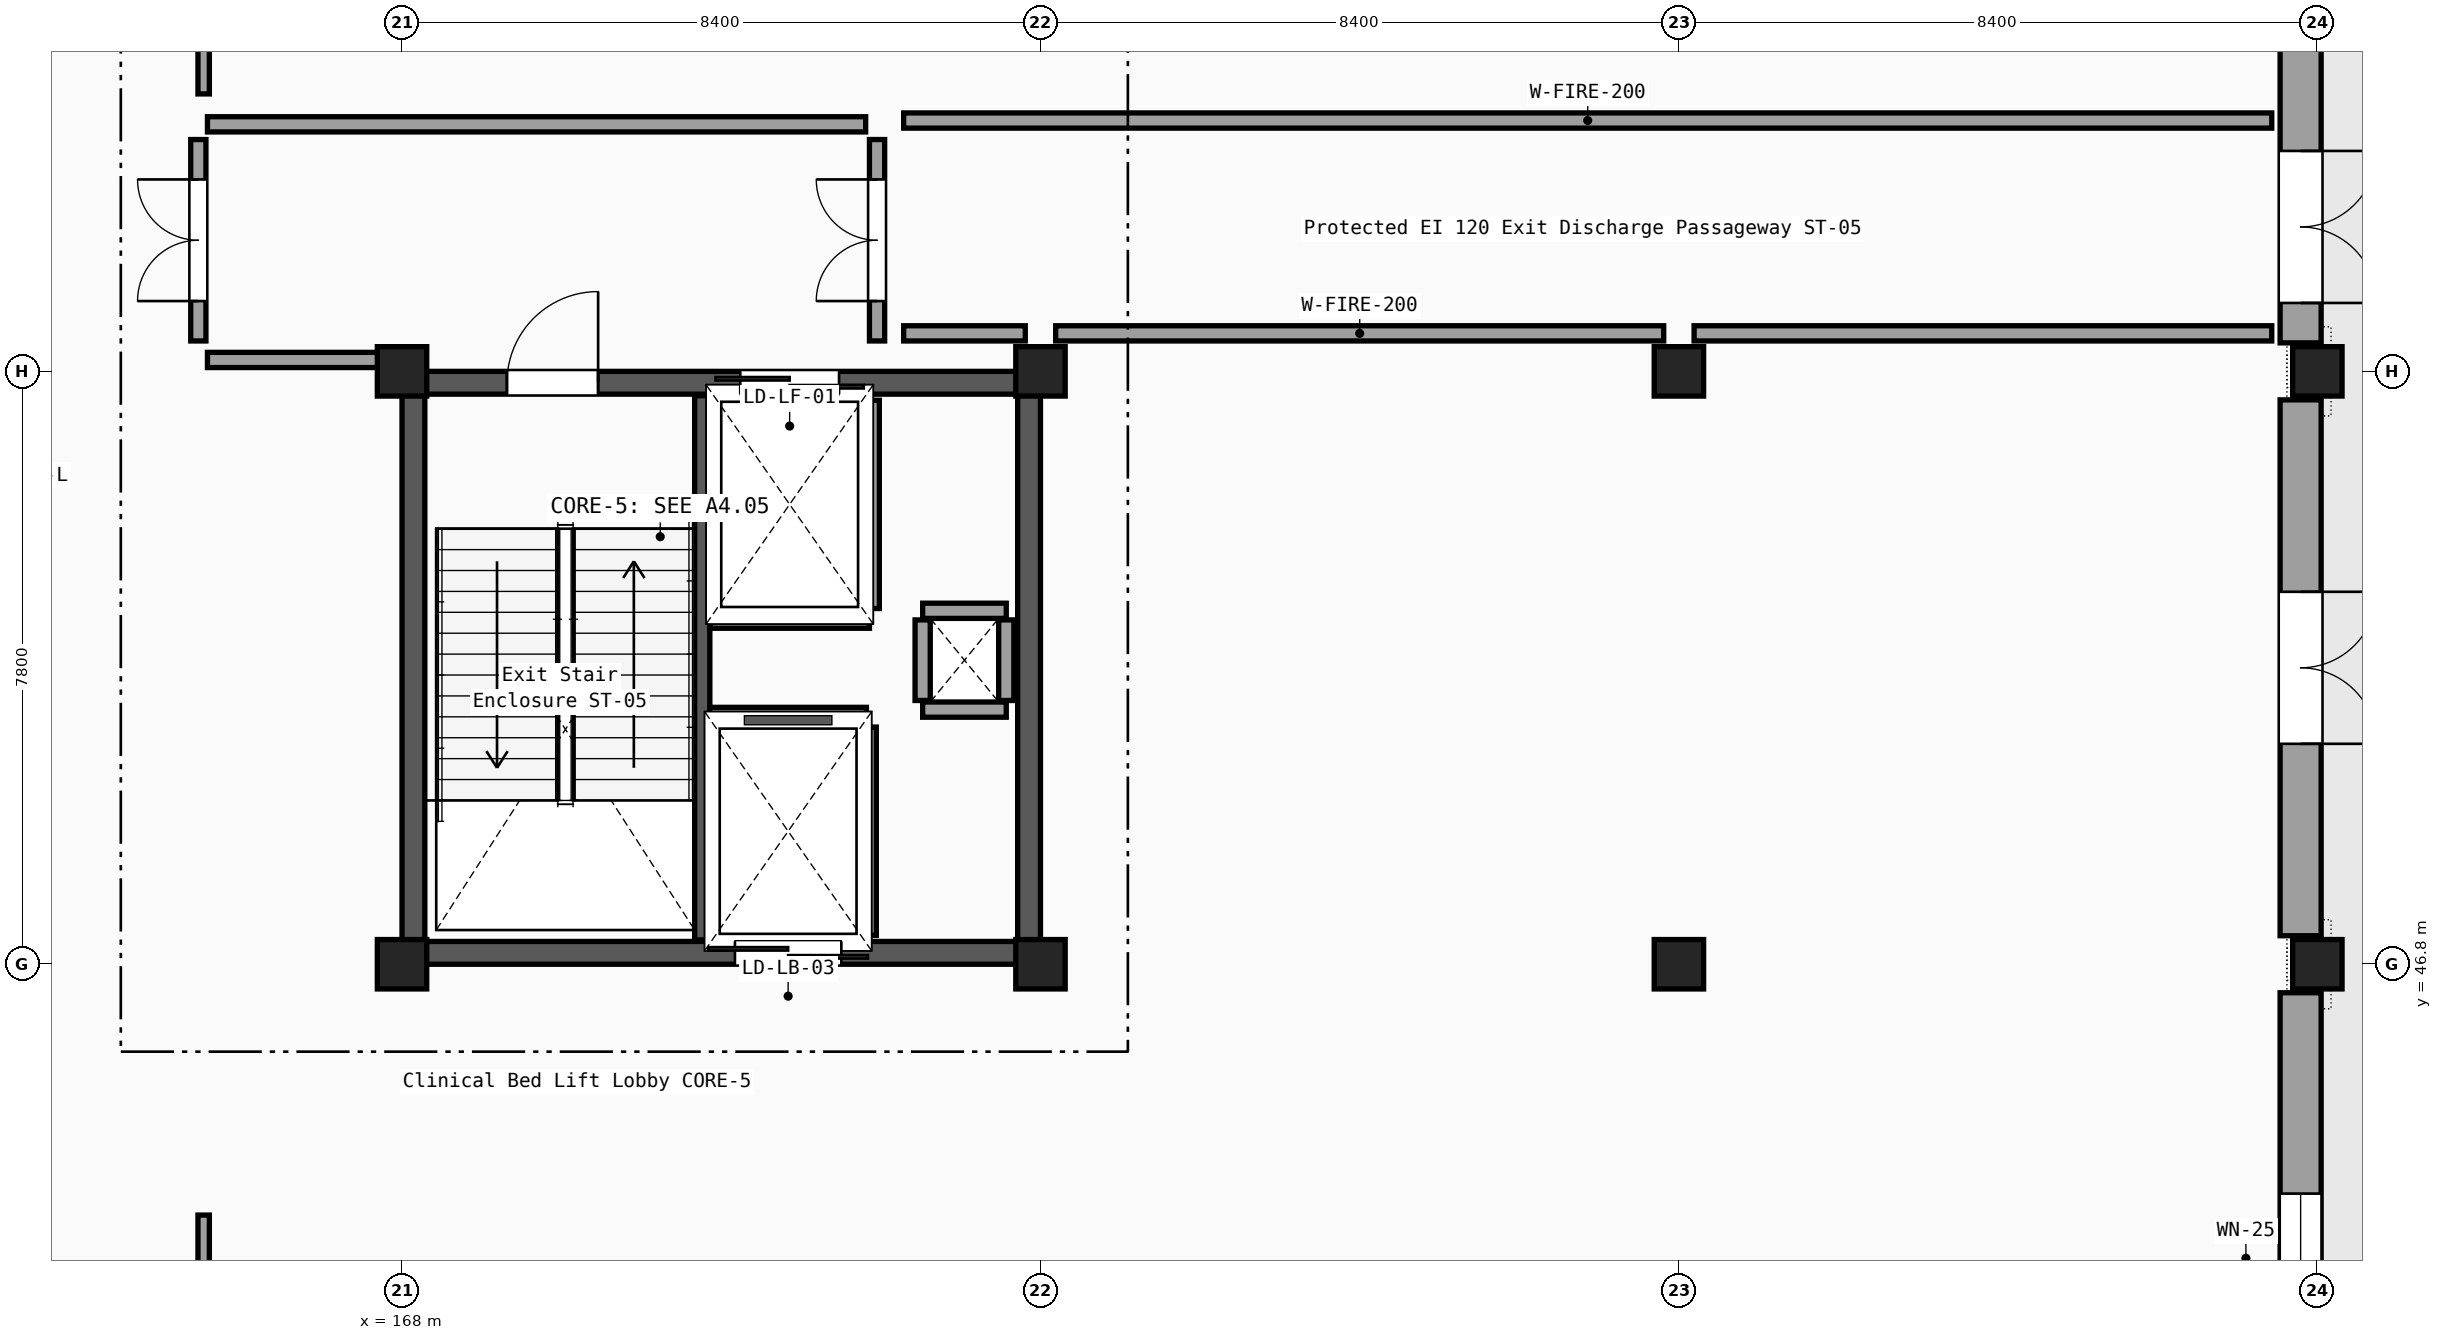
"""IFC4 building model, lengths in metres.
Left out: names, types, materials, properties, quantities, classifications, styles, units other than length and angle.
Written with IfcOpenShell. Run it as: python <this file> out.ifc"""

import sys

from ifc_helpers import new_model, si_unit, direction, frame, frame_2d, origin, origin_2d, place, context, subcontext, project, spatial, rectangle, i_section, extrude, element, fill, save


model = new_model("IFC4")
c1 = context("Model", 3, precision=1e-05, world=origin(), true_north=direction((0.0, 1.0)))
c2 = subcontext(c1, "Body", "Model", "MODEL_VIEW")
j1 = project(units=[si_unit("LENGTHUNIT", "METRE"), si_unit("PLANEANGLEUNIT", "RADIAN")], contexts=[c1])
p1 = place(None, origin())
s1 = spatial("IfcSite", under=j1, at=p1, CompositionType="ELEMENT")
p2 = place(p1, origin())
s2 = spatial("IfcBuilding", under=s1, at=p2, CompositionType="ELEMENT")
p3 = place(p2, origin())
s3 = spatial("IfcBuildingStorey", under=s2, at=p3, CompositionType="ELEMENT", Elevation=0.0)
for number, where, z_axis, x_axis in (
    (1, (168.0, 46.8, 0.0), (0.0, 0.0, 1.0), (1.0, 0.0, 0.0)),
    (2, (168.0, 54.6, 0.0), (0.0, 0.0, 1.0), (1.0, 0.0, 0.0)),
    (3, (176.4, 46.8, 0.0), (0.0, 0.0, 1.0), (1.0, 0.0, 0.0)),
    (4, (176.4, 54.6, 0.0), (0.0, 0.0, 1.0), (1.0, 0.0, 0.0)),
    (5, (184.8, 46.8, 0.0), (0.0, 0.0, 1.0), (1.0, 0.0, 0.0)),
    (6, (184.8, 54.6, 0.0), (0.0, 0.0, 1.0), (1.0, 0.0, 0.0)),
    (7, (193.2, 46.8, 0.0), (0.0, 0.0, 1.0), (1.0, 0.0, 0.0)),
    (8, (193.2, 54.6, 0.0), (0.0, 0.0, 1.0), (1.0, 0.0, 0.0)),
):
    element("IfcColumn", number, at=place(p3, frame(where, z_axis=z_axis, x_axis=x_axis)), inside=s3, PredefinedType="COLUMN", context=c2, shape_type="SweptSolid", body=[
        extrude(i_section(OverallWidth=0.3, OverallDepth=0.65, WebThickness=0.016, FlangeThickness=0.031, FilletRadius=0.027, at=origin_2d()), origin(), (0.0, 0.0, 1.0), 5.1),
    ])
p4 = place(p3, frame((192.98, 39.44, 0.0), z_axis=(0.0, 0.0, 1.0), x_axis=(0.0, 1.0, 0.0)))
e9 = element("IfcWall", 9, at=p4, inside=s3, PredefinedType="SOLIDWALL", context=c2, shape_type="SweptSolid", body=[
    extrude(rectangle(XDim=6.985, YDim=0.54, at=frame_2d((3.493, 0.0))), origin(), (0.0, 0.0, 1.0), 4.33),
])
p5 = place(p4, frame((2.643, 0.0, 0.95)))
e10 = element("IfcOpeningElement", 10, at=p5, cuts=e9, PredefinedType="OPENING", context=c2, shape_type="SweptSolid", body=[
    extrude(rectangle(XDim=1.7, YDim=1.55, at=frame_2d((0.85, 0.775))), frame((0.0, 0.28, 0.0), z_axis=(0.0, -1.0, 0.0), x_axis=(1.0, 0.0, 0.0)), (0.0, 0.0, 1.0), 0.56),
])
p6 = place(p3, frame((192.98, 47.175, 0.0), z_axis=(0.0, 0.0, 1.0), x_axis=(0.0, 1.0, 0.0)))
e11 = element("IfcWall", 11, at=p6, inside=s3, PredefinedType="SOLIDWALL", context=c2, shape_type="SweptSolid", body=[
    extrude(rectangle(XDim=7.05, YDim=0.54, at=frame_2d((3.525, 0.0))), origin(), (0.0, 0.0, 1.0), 4.33),
])
p7 = place(p6, frame((2.525, 0.0, 0.0)))
e12 = element("IfcOpeningElement", 12, at=p7, cuts=e11, PredefinedType="OPENING", context=c2, shape_type="SweptSolid", body=[
    extrude(rectangle(XDim=2.0, YDim=2.25, at=frame_2d((1.0, 1.125))), frame((0.0, 0.28, 0.0), z_axis=(0.0, -1.0, 0.0), x_axis=(1.0, 0.0, 0.0)), (0.0, 0.0, 1.0), 0.56),
])
p8 = place(p3, frame((192.98, 54.975, 0.0), z_axis=(0.0, 0.0, 1.0), x_axis=(0.0, 1.0, 0.0)))
e13 = element("IfcWall", 13, at=p8, inside=s3, PredefinedType="SOLIDWALL", context=c2, shape_type="SweptSolid", body=[
    extrude(rectangle(XDim=7.05, YDim=0.54, at=frame_2d((3.525, 0.0))), origin(), (0.0, 0.0, 1.0), 4.33),
])
p9 = place(p8, frame((0.525, 0.0, 0.0)))
e14 = element("IfcOpeningElement", 14, at=p9, cuts=e13, PredefinedType="OPENING", context=c2, shape_type="SweptSolid", body=[
    extrude(rectangle(XDim=2.0, YDim=2.25, at=frame_2d((1.0, 1.125))), frame((0.0, 0.28, 0.0), z_axis=(0.0, -1.0, 0.0), x_axis=(1.0, 0.0, 0.0)), (0.0, 0.0, 1.0), 0.56),
])
p10 = place(p3, frame((168.0, 46.95, 0.0), z_axis=(0.0, 0.0, 1.0), x_axis=(1.0, 0.0, 0.0)))
e15 = element("IfcWall", 15, at=p10, inside=s3, PredefinedType="SHEAR", context=c2, shape_type="SweptSolid", body=[
    extrude(rectangle(XDim=8.4, YDim=0.3, at=frame_2d((4.2, 0.0))), origin(), (0.0, 0.0, 1.0), 4.85),
])
p11 = place(p10, frame((4.38, 0.0, 0.0)))
e16 = element("IfcOpeningElement", 16, at=p11, cuts=e15, PredefinedType="OPENING", context=c2, shape_type="SweptSolid", body=[
    extrude(rectangle(XDim=1.4, YDim=2.2, at=frame_2d((0.7, 1.1))), frame((0.0, 0.16, 0.0), z_axis=(0.0, -1.0, 0.0), x_axis=(1.0, 0.0, 0.0)), (0.0, 0.0, 1.0), 0.32),
])
p12 = place(p3, frame((168.0, 54.45, 0.0), z_axis=(0.0, 0.0, 1.0), x_axis=(1.0, 0.0, 0.0)))
e17 = element("IfcWall", 17, at=p12, inside=s3, PredefinedType="SHEAR", context=c2, shape_type="SweptSolid", body=[
    extrude(rectangle(XDim=8.4, YDim=0.3, at=frame_2d((4.2, 0.0))), origin(), (0.0, 0.0, 1.0), 4.85),
])
p13 = place(p12, frame((1.38, 0.0, 0.0)))
e18 = element("IfcOpeningElement", 18, at=p13, cuts=e17, PredefinedType="OPENING", context=c2, shape_type="SweptSolid", body=[
    extrude(rectangle(XDim=1.2, YDim=2.15, at=frame_2d((0.6, 1.075))), frame((0.0, 0.16, 0.0), z_axis=(0.0, -1.0, 0.0), x_axis=(1.0, 0.0, 0.0)), (0.0, 0.0, 1.0), 0.32),
])
p14 = place(p12, frame((4.45, 0.0, 0.0)))
e19 = element("IfcOpeningElement", 19, at=p14, cuts=e17, PredefinedType="OPENING", context=c2, shape_type="SweptSolid", body=[
    extrude(rectangle(XDim=1.3, YDim=2.2, at=frame_2d((0.65, 1.1))), frame((0.0, 0.16, 0.0), z_axis=(0.0, -1.0, 0.0), x_axis=(1.0, 0.0, 0.0)), (0.0, 0.0, 1.0), 0.32),
])
for number, where, z_axis, x_axis in (
    (20, (168.15, 47.1, 0.0), (0.0, 0.0, 1.0), (0.0, 1.0, 0.0)),
    (21, (176.25, 47.1, 0.0), (0.0, 0.0, 1.0), (0.0, 1.0, 0.0)),
):
    element("IfcWall", number, at=place(p3, frame(where, z_axis=z_axis, x_axis=x_axis)), inside=s3, PredefinedType="SHEAR", context=c2, shape_type="SweptSolid", body=[
        extrude(rectangle(XDim=7.2, YDim=0.3, at=frame_2d((3.6, 0.0))), origin(), (0.0, 0.0, 1.0), 4.85),
    ])
p15 = place(p3, frame((171.95, 47.12, 0.0), z_axis=(0.0, 0.0, 1.0), x_axis=(0.0, 1.0, 0.0)))
e22 = element("IfcWall", 22, at=p15, inside=s3, PredefinedType="SHEAR", context=c2, shape_type="SweptSolid", body=[
    extrude(rectangle(XDim=7.16, YDim=0.2, at=frame_2d((3.58, 0.0))), origin(), (0.0, 0.0, 1.0), 4.85),
])
for number, where, z_axis, x_axis in (
    (23, (174.85, 50.15, 0.0), (0.0, 0.0, 1.0), (1.0, 0.0, 0.0)),
    (24, (174.85, 51.45, 0.0), (0.0, 0.0, 1.0), (1.0, 0.0, 0.0)),
):
    element("IfcWall", number, at=place(p3, frame(where, z_axis=z_axis, x_axis=x_axis)), inside=s3, PredefinedType="PARTITIONING", context=c2, shape_type="SweptSolid", body=[
        extrude(rectangle(XDim=1.1, YDim=0.2, at=frame_2d((0.55, 0.0))), origin(), (0.0, 0.0, 1.0), 4.33),
    ])
for number, where, z_axis, x_axis in (
    (25, (174.85, 50.27, 0.0), (0.0, 0.0, 1.0), (0.0, 1.0, 0.0)),
    (26, (175.95, 50.27, 0.0), (0.0, 0.0, 1.0), (0.0, 1.0, 0.0)),
):
    element("IfcWall", number, at=place(p3, frame(where, z_axis=z_axis, x_axis=x_axis)), inside=s3, PredefinedType="PARTITIONING", context=c2, shape_type="SweptSolid", body=[
        extrude(rectangle(XDim=1.06, YDim=0.2, at=frame_2d((0.53, 0.0))), origin(), (0.0, 0.0, 1.0), 4.33),
    ])
p16 = place(p3, frame((174.18, 51.48, 0.0), z_axis=(0.0, 0.0, 1.0), x_axis=(0.0, 1.0, 0.0)))
e27 = element("IfcWall", 27, at=p16, inside=s3, PredefinedType="PARTITIONING", context=c2, shape_type="SweptSolid", body=[
    extrude(rectangle(XDim=2.74, YDim=0.2, at=frame_2d((1.37, 0.0))), origin(), (0.0, 0.0, 1.0), 4.33),
])
p17 = place(p3, frame((172.05, 51.32, 0.0), z_axis=(0.0, 0.0, 1.0), x_axis=(1.0, 0.0, 0.0)))
e28 = element("IfcWall", 28, at=p17, inside=s3, PredefinedType="PARTITIONING", context=c2, shape_type="SweptSolid", body=[
    extrude(rectangle(XDim=2.1, YDim=0.2, at=frame_2d((1.05, 0.0))), origin(), (0.0, 0.0, 1.0), 4.33),
])
p18 = place(p3, frame((174.14, 47.18, 0.0), z_axis=(0.0, 0.0, 1.0), x_axis=(0.0, 1.0, 0.0)))
e29 = element("IfcWall", 29, at=p18, inside=s3, PredefinedType="PARTITIONING", context=c2, shape_type="SweptSolid", body=[
    extrude(rectangle(XDim=2.74, YDim=0.2, at=frame_2d((1.37, 0.0))), origin(), (0.0, 0.0, 1.0), 4.33),
])
p19 = place(p3, frame((172.05, 50.08, 0.0), z_axis=(0.0, 0.0, 1.0), x_axis=(1.0, 0.0, 0.0)))
e30 = element("IfcWall", 30, at=p19, inside=s3, PredefinedType="PARTITIONING", context=c2, shape_type="SweptSolid", body=[
    extrude(rectangle(XDim=2.06, YDim=0.2, at=frame_2d((1.03, 0.0))), origin(), (0.0, 0.0, 1.0), 4.33),
])
p20 = place(p3, frame((165.44, 54.75, 0.0), z_axis=(0.0, 0.0, 1.0), x_axis=(1.0, 0.0, 0.0)))
e31 = element("IfcWall", 31, at=p20, inside=s3, PredefinedType="PARTITIONING", context=c2, shape_type="SweptSolid", body=[
    extrude(rectangle(XDim=2.44, YDim=0.2, at=frame_2d((1.22, 0.0))), origin(), (0.0, 0.0, 1.0), 4.33),
])
p21 = place(p3, frame((165.44, 57.85, 0.0), z_axis=(0.0, 0.0, 1.0), x_axis=(1.0, 0.0, 0.0)))
e32 = element("IfcWall", 32, at=p21, inside=s3, PredefinedType="PARTITIONING", context=c2, shape_type="SweptSolid", body=[
    extrude(rectangle(XDim=8.66, YDim=0.2, at=frame_2d((4.33, 0.0))), origin(), (0.0, 0.0, 1.0), 4.33),
])
p22 = place(p3, frame((165.32, 55.0, 0.0), z_axis=(0.0, 0.0, 1.0), x_axis=(0.0, 1.0, 0.0)))
e33 = element("IfcWall", 33, at=p22, inside=s3, PredefinedType="PARTITIONING", context=c2, shape_type="SweptSolid", body=[
    extrude(rectangle(XDim=2.65, YDim=0.2, at=frame_2d((1.325, 0.0))), origin(), (0.0, 0.0, 1.0), 4.33),
])
p23 = place(p22, frame((0.525, 0.0, 0.0)))
e34 = element("IfcOpeningElement", 34, at=p23, cuts=e33, PredefinedType="OPENING", context=c2, shape_type="SweptSolid", body=[
    extrude(rectangle(XDim=1.6, YDim=2.2, at=frame_2d((0.8, 1.1))), frame((0.0, 0.11, 0.0), z_axis=(0.0, -1.0, 0.0), x_axis=(1.0, 0.0, 0.0)), (0.0, 0.0, 1.0), 0.22),
])
p24 = place(p3, frame((174.25, 55.0, 0.0), z_axis=(0.0, 0.0, 1.0), x_axis=(0.0, 1.0, 0.0)))
e35 = element("IfcWall", 35, at=p24, inside=s3, PredefinedType="PARTITIONING", context=c2, shape_type="SweptSolid", body=[
    extrude(rectangle(XDim=2.65, YDim=0.2, at=frame_2d((1.325, 0.0))), origin(), (0.0, 0.0, 1.0), 4.33),
])
p25 = place(p24, frame((0.525, 0.0, 0.0)))
e36 = element("IfcOpeningElement", 36, at=p25, cuts=e35, PredefinedType="OPENING", context=c2, shape_type="SweptSolid", body=[
    extrude(rectangle(XDim=1.6, YDim=2.2, at=frame_2d((0.8, 1.1))), frame((0.0, 0.11, 0.0), z_axis=(0.0, -1.0, 0.0), x_axis=(1.0, 0.0, 0.0)), (0.0, 0.0, 1.0), 0.22),
])
p26 = place(p3, frame((174.6, 55.1, 0.0), z_axis=(0.0, 0.0, 1.0), x_axis=(1.0, 0.0, 0.0)))
e37 = element("IfcWall", 37, at=p26, inside=s3, PredefinedType="PARTITIONING", context=c2, shape_type="SweptSolid", body=[
    extrude(rectangle(XDim=1.6, YDim=0.2, at=frame_2d((0.8, 0.0))), origin(), (0.0, 0.0, 1.0), 4.38),
])
p27 = place(p3, frame((176.6, 55.1, 0.0), z_axis=(0.0, 0.0, 1.0), x_axis=(1.0, 0.0, 0.0)))
e38 = element("IfcWall", 38, at=p27, inside=s3, PredefinedType="PARTITIONING", context=c2, shape_type="SweptSolid", body=[
    extrude(rectangle(XDim=8.0, YDim=0.2, at=frame_2d((4.0, 0.0))), origin(), (0.0, 0.0, 1.0), 4.38),
])
p28 = place(p3, frame((185.0, 55.1, 0.0), z_axis=(0.0, 0.0, 1.0), x_axis=(1.0, 0.0, 0.0)))
e39 = element("IfcWall", 39, at=p28, inside=s3, PredefinedType="PARTITIONING", context=c2, shape_type="SweptSolid", body=[
    extrude(rectangle(XDim=7.6, YDim=0.2, at=frame_2d((3.8, 0.0))), origin(), (0.0, 0.0, 1.0), 4.38),
])
p29 = place(p3, frame((174.6, 57.9, 0.0), z_axis=(0.0, 0.0, 1.0), x_axis=(1.0, 0.0, 0.0)))
e40 = element("IfcWall", 40, at=p29, inside=s3, PredefinedType="PARTITIONING", context=c2, shape_type="SweptSolid", body=[
    extrude(rectangle(XDim=18.0, YDim=0.2, at=frame_2d((9.0, 0.0))), origin(), (0.0, 0.0, 1.0), 4.38),
])
p30 = place(p3, frame((165.39, 39.62, 0.0), z_axis=(0.0, 0.0, 1.0), x_axis=(0.0, 1.0, 0.0)))
e41 = element("IfcWall", 41, at=p30, inside=s3, PredefinedType="PARTITIONING", context=c2, shape_type="SweptSolid", body=[
    extrude(rectangle(XDim=3.88, YDim=0.15, at=frame_2d((1.94, 0.0))), origin(), (0.0, 0.0, 1.0), 4.82),
])
p31 = place(p30, frame((1.24, 0.0, 0.0)))
e42 = element("IfcOpeningElement", 42, at=p31, cuts=e41, PredefinedType="OPENING", context=c2, shape_type="SweptSolid", body=[
    extrude(rectangle(XDim=1.4, YDim=2.2, at=frame_2d((0.7, 1.1))), frame((0.0, 0.085, 0.0), z_axis=(0.0, -1.0, 0.0), x_axis=(1.0, 0.0, 0.0)), (0.0, 0.0, 1.0), 0.17),
])
p32 = place(p3, frame((165.39, 58.25, 0.0), z_axis=(0.0, 0.0, 1.0), x_axis=(0.0, 1.0, 0.0)))
e43 = element("IfcWall", 43, at=p32, inside=s3, PredefinedType="PARTITIONING", context=c2, shape_type="SweptSolid", body=[
    extrude(rectangle(XDim=8.65, YDim=0.15, at=frame_2d((4.325, 0.0))), origin(), (0.0, 0.0, 1.0), 4.33),
])
p33 = place(p32, frame((3.8, 0.0, 0.0)))
e44 = element("IfcOpeningElement", 44, at=p33, cuts=e43, PredefinedType="OPENING", context=c2, shape_type="SweptSolid", body=[
    extrude(rectangle(XDim=1.05, YDim=2.15, at=frame_2d((0.525, 1.075))), frame((0.0, 0.085, 0.0), z_axis=(0.0, -1.0, 0.0), x_axis=(1.0, 0.0, 0.0)), (0.0, 0.0, 1.0), 0.17),
])
p34 = place(p5, origin())
e45 = element("IfcWindow", 45, at=p34, inside=s3, PartitioningType="SINGLE_PANEL", PredefinedType="WINDOW", context=c2, shape_type="SweptSolid", body=[
    extrude(rectangle(XDim=1.7, YDim=1.55, at=frame_2d((0.85, 0.775))), frame((0.0, 0.03, 0.0), z_axis=(0.0, -1.0, 0.0), x_axis=(1.0, 0.0, 0.0)), (0.0, 0.0, 1.0), 0.06),
])
fill(e10, e45)
p35 = place(p7, frame((2.0, 0.0, 0.0), z_axis=(0.0, 0.0, 1.0), x_axis=(-1.0, 0.0, 0.0)))
e46 = element("IfcDoor", 46, at=p35, inside=s3, OperationType="DOUBLE_DOOR_SINGLE_SWING", PredefinedType="DOOR", context=c2, shape_type="SweptSolid", body=[
    extrude(rectangle(XDim=2.0, YDim=2.25, at=frame_2d((1.0, 1.125))), frame((0.0, 0.025, 0.0), z_axis=(0.0, -1.0, 0.0), x_axis=(1.0, 0.0, 0.0)), (0.0, 0.0, 1.0), 0.05),
])
fill(e12, e46)
p36 = place(p9, frame((2.0, 0.0, 0.0), z_axis=(0.0, 0.0, 1.0), x_axis=(-1.0, 0.0, 0.0)))
e47 = element("IfcDoor", 47, at=p36, inside=s3, OperationType="DOUBLE_DOOR_SINGLE_SWING", PredefinedType="DOOR", context=c2, shape_type="SweptSolid", body=[
    extrude(rectangle(XDim=2.0, YDim=2.25, at=frame_2d((1.0, 1.125))), frame((0.0, 0.025, 0.0), z_axis=(0.0, -1.0, 0.0), x_axis=(1.0, 0.0, 0.0)), (0.0, 0.0, 1.0), 0.05),
])
fill(e14, e47)
p37 = place(p13, origin())
e48 = element("IfcDoor", 48, at=p37, inside=s3, OperationType="SINGLE_SWING_RIGHT", PredefinedType="DOOR", context=c2, shape_type="SweptSolid", body=[
    extrude(rectangle(XDim=1.2, YDim=2.15, at=frame_2d((0.6, 1.075))), frame((0.0, 0.025, 0.0), z_axis=(0.0, -1.0, 0.0), x_axis=(1.0, 0.0, 0.0)), (0.0, 0.0, 1.0), 0.05),
])
fill(e18, e48)
p38 = place(p14, origin())
e49 = element("IfcDoor", 49, at=p38, inside=s3, OperationType="DOUBLE_DOOR_SLIDING", PredefinedType="DOOR", context=c2, shape_type="SweptSolid", body=[
    extrude(rectangle(XDim=1.3, YDim=2.2, at=frame_2d((0.65, 1.1))), frame((0.0, 0.025, 0.0), z_axis=(0.0, -1.0, 0.0), x_axis=(1.0, 0.0, 0.0)), (0.0, 0.0, 1.0), 0.05),
])
fill(e19, e49)
p39 = place(p11, origin())
e50 = element("IfcDoor", 50, at=p39, inside=s3, OperationType="DOUBLE_DOOR_SLIDING", PredefinedType="DOOR", context=c2, shape_type="SweptSolid", body=[
    extrude(rectangle(XDim=1.4, YDim=2.2, at=frame_2d((0.7, 1.1))), frame((0.0, 0.025, 0.0), z_axis=(0.0, -1.0, 0.0), x_axis=(1.0, 0.0, 0.0)), (0.0, 0.0, 1.0), 0.05),
])
fill(e16, e50)
p40 = place(p23, origin())
e51 = element("IfcDoor", 51, at=p40, inside=s3, OperationType="DOUBLE_DOOR_SINGLE_SWING", PredefinedType="DOOR", context=c2, shape_type="SweptSolid", body=[
    extrude(rectangle(XDim=1.6, YDim=2.2, at=frame_2d((0.8, 1.1))), frame((0.0, 0.025, 0.0), z_axis=(0.0, -1.0, 0.0), x_axis=(1.0, 0.0, 0.0)), (0.0, 0.0, 1.0), 0.05),
])
fill(e34, e51)
p41 = place(p25, origin())
e52 = element("IfcDoor", 52, at=p41, inside=s3, OperationType="DOUBLE_DOOR_SINGLE_SWING", PredefinedType="DOOR", context=c2, shape_type="SweptSolid", body=[
    extrude(rectangle(XDim=1.6, YDim=2.2, at=frame_2d((0.8, 1.1))), frame((0.0, 0.025, 0.0), z_axis=(0.0, -1.0, 0.0), x_axis=(1.0, 0.0, 0.0)), (0.0, 0.0, 1.0), 0.05),
])
fill(e36, e52)
save(model, sys.argv[1])
